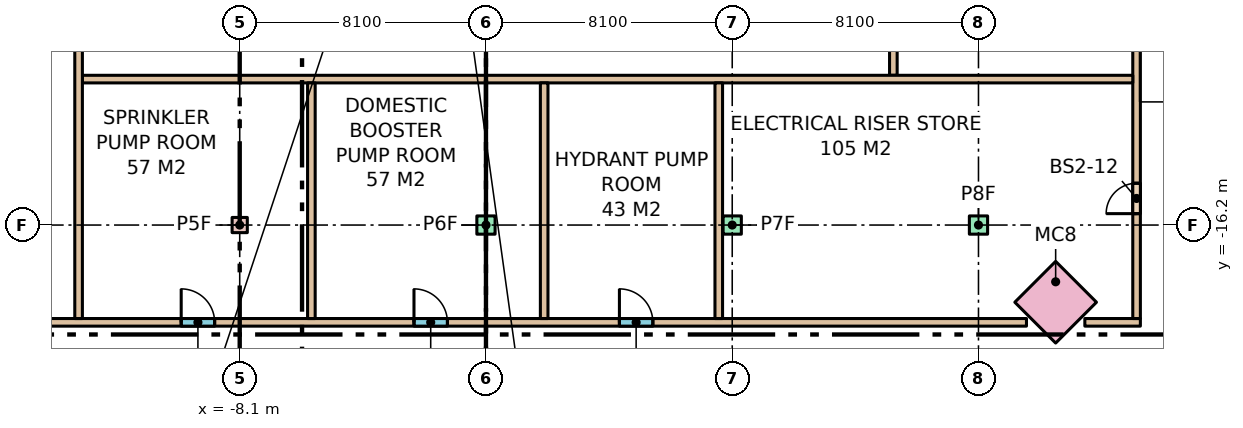
"""IFC4 building model, lengths in metres.
Left out: names, types, materials, properties, quantities, classifications, styles, units other than length and angle.
Written with IfcOpenShell. Run it as: python <this file> out.ifc"""

import sys

from ifc_helpers import new_model, si_unit, direction, frame, frame_2d, origin, origin_2d, place, context, subcontext, project, spatial, rectangle, extrude, element, fill, save


model = new_model("IFC4")
c1 = context("Model", 3, precision=1e-05, world=origin(), true_north=direction((0.0, 1.0)))
c2 = subcontext(c1, "Body", "Model", "MODEL_VIEW")
j1 = project(units=[si_unit("LENGTHUNIT", "METRE"), si_unit("PLANEANGLEUNIT", "RADIAN")], contexts=[c1])
p1 = place(None, origin())
s1 = spatial("IfcSite", under=j1, at=p1, CompositionType="ELEMENT")
p2 = place(p1, origin())
s2 = spatial("IfcBuilding", under=s1, at=p2, CompositionType="ELEMENT")
p3 = place(p2, frame((0.0, 0.0, -7.2)))
s3 = spatial("IfcBuildingStorey", under=s2, at=p3, CompositionType="ELEMENT", Elevation=-7.2)
p4 = place(p3, frame((-8.1, -16.2, 0.0), z_axis=(0.0, 0.0, 1.0), x_axis=(1.0, 0.0, 0.0)))
e1 = element("IfcColumn", 1, at=p4, inside=s3, PredefinedType="COLUMN", context=c2, shape_type="SweptSolid", body=[
    extrude(rectangle(XDim=0.5, YDim=0.5, at=origin_2d()), origin(), (0.0, 0.0, 1.0), 3.6),
])
for number, where, z_axis, x_axis in (
    (2, (0.0, -16.2, 0.0), (0.0, 0.0, 1.0), (1.0, 0.0, 0.0)),
    (3, (8.1, -16.2, 0.0), (0.0, 0.0, 1.0), (1.0, 0.0, 0.0)),
    (4, (16.2, -16.2, 0.0), (0.0, 0.0, 1.0), (1.0, 0.0, 0.0)),
):
    element("IfcColumn", number, at=place(p3, frame(where, z_axis=z_axis, x_axis=x_axis)), inside=s3, PredefinedType="COLUMN", context=c2, shape_type="SweptSolid", body=[
        extrude(rectangle(XDim=0.6, YDim=0.6, at=origin_2d()), origin(), (0.0, 0.0, 1.0), 3.6),
    ])
p5 = place(p3, frame((18.738, -18.738, 0.0), z_axis=(0.0, 0.0, 1.0), x_axis=(0.707106781187, 0.707106781187, 0.0)))
e5 = element("IfcColumn", 5, at=p5, inside=s3, PredefinedType="COLUMN", context=c2, shape_type="SweptSolid", body=[
    extrude(rectangle(XDim=1.9, YDim=1.9, at=origin_2d()), origin(), (0.0, 0.0, 1.0), 3.6),
])
p6 = place(p3, frame((13.4, -11.275, 0.0), z_axis=(0.0, 0.0, 1.0), x_axis=(0.0, 1.0, 0.0)))
e6 = element("IfcWall", 6, at=p6, inside=s3, PredefinedType="PARTITIONING", context=c2, shape_type="SweptSolid", body=[
    extrude(rectangle(XDim=22.55, YDim=0.25, at=frame_2d((11.275, 0.0))), origin(), (0.0, 0.0, 1.0), 3.28),
])
p7 = place(p3, frame((19.698, -19.4, 0.0), z_axis=(0.0, 0.0, 1.0), x_axis=(1.0, 0.0, 0.0)))
e7 = element("IfcWall", 7, at=p7, inside=s3, PredefinedType="PARTITIONING", context=c2, shape_type="SweptSolid", body=[
    extrude(rectangle(XDim=1.827, YDim=0.25, at=frame_2d((0.913, 0.0))), origin(), (0.0, 0.0, 1.0), 3.28),
])
p8 = place(p3, frame((21.4, -19.275, 0.0), z_axis=(0.0, 0.0, 1.0), x_axis=(0.0, 1.0, 0.0)))
e8 = element("IfcWall", 8, at=p8, inside=s3, PredefinedType="PARTITIONING", context=c2, shape_type="SweptSolid", body=[
    extrude(rectangle(XDim=38.55, YDim=0.25, at=frame_2d((19.275, 0.0))), origin(), (0.0, 0.0, 1.0), 3.28),
])
p9 = place(p8, frame((3.45, 0.0, 0.0)))
e9 = element("IfcOpeningElement", 9, at=p9, cuts=e8, PredefinedType="OPENING", context=c2, shape_type="SweptSolid", body=[
    extrude(rectangle(XDim=1.0, YDim=2.1, at=frame_2d((0.5, 1.05))), frame((0.0, 0.135, 0.0), z_axis=(0.0, -1.0, 0.0), x_axis=(1.0, 0.0, 0.0)), (0.0, 0.0, 1.0), 0.27),
])
p10 = place(p8, frame((13.025, 0.0, 0.0)))
e10 = element("IfcOpeningElement", 10, at=p10, cuts=e8, PredefinedType="OPENING", context=c2, shape_type="SweptSolid", body=[
    extrude(rectangle(XDim=1.1, YDim=2.1, at=frame_2d((0.55, 1.05))), frame((0.0, 0.135, 0.0), z_axis=(0.0, -1.0, 0.0), x_axis=(1.0, 0.0, 0.0)), (0.0, 0.0, 1.0), 0.27),
])
p11 = place(p8, frame((24.425, 0.0, 0.0)))
e11 = element("IfcOpeningElement", 11, at=p11, cuts=e8, PredefinedType="OPENING", context=c2, shape_type="SweptSolid", body=[
    extrude(rectangle(XDim=1.1, YDim=2.1, at=frame_2d((0.55, 1.05))), frame((0.0, 0.135, 0.0), z_axis=(0.0, -1.0, 0.0), x_axis=(1.0, 0.0, 0.0)), (0.0, 0.0, 1.0), 0.27),
])
p12 = place(p3, frame((-17.778, -19.4, 0.0), z_axis=(0.0, 0.0, 1.0), x_axis=(1.0, 0.0, 0.0)))
e12 = element("IfcWall", 12, at=p12, inside=s3, PredefinedType="PARTITIONING", context=c2, shape_type="SweptSolid", body=[
    extrude(rectangle(XDim=35.557, YDim=0.25, at=frame_2d((17.778, 0.0))), origin(), (0.0, 0.0, 1.0), 3.28),
])
p13 = place(p12, frame((7.753, 0.0, 0.0)))
e13 = element("IfcOpeningElement", 13, at=p13, cuts=e12, PredefinedType="OPENING", context=c2, shape_type="SweptSolid", body=[
    extrude(rectangle(XDim=1.1, YDim=2.1, at=frame_2d((0.55, 1.05))), frame((0.0, 0.135, 0.0), z_axis=(0.0, -1.0, 0.0), x_axis=(1.0, 0.0, 0.0)), (0.0, 0.0, 1.0), 0.27),
])
p14 = place(p12, frame((15.41, 0.0, 0.0)))
e14 = element("IfcOpeningElement", 14, at=p14, cuts=e12, PredefinedType="OPENING", context=c2, shape_type="SweptSolid", body=[
    extrude(rectangle(XDim=1.1, YDim=2.1, at=frame_2d((0.55, 1.05))), frame((0.0, 0.135, 0.0), z_axis=(0.0, -1.0, 0.0), x_axis=(1.0, 0.0, 0.0)), (0.0, 0.0, 1.0), 0.27),
])
p15 = place(p12, frame((22.167, 0.0, 0.0)))
e15 = element("IfcOpeningElement", 15, at=p15, cuts=e12, PredefinedType="OPENING", context=c2, shape_type="SweptSolid", body=[
    extrude(rectangle(XDim=1.1, YDim=2.1, at=frame_2d((0.55, 1.05))), frame((0.0, 0.135, 0.0), z_axis=(0.0, -1.0, 0.0), x_axis=(1.0, 0.0, 0.0)), (0.0, 0.0, 1.0), 0.27),
])
p16 = place(p3, frame((-13.275, -11.4, 0.0), z_axis=(0.0, 0.0, 1.0), x_axis=(1.0, 0.0, 0.0)))
e16 = element("IfcWall", 16, at=p16, inside=s3, PredefinedType="PARTITIONING", context=c2, shape_type="SweptSolid", body=[
    extrude(rectangle(XDim=34.55, YDim=0.25, at=frame_2d((17.275, 0.0))), origin(), (0.0, 0.0, 1.0), 3.28),
])
p17 = place(p3, frame((-5.743, -19.275, 0.0), z_axis=(0.0, 0.0, 1.0), x_axis=(0.0, 1.0, 0.0)))
e17 = element("IfcWall", 17, at=p17, inside=s3, PredefinedType="PARTITIONING", context=c2, shape_type="SweptSolid", body=[
    extrude(rectangle(XDim=7.75, YDim=0.25, at=frame_2d((3.875, 0.0))), origin(), (0.0, 0.0, 1.0), 3.28),
])
p18 = place(p3, frame((-13.4, -19.275, 0.0), z_axis=(0.0, 0.0, 1.0), x_axis=(0.0, 1.0, 0.0)))
e18 = element("IfcWall", 18, at=p18, inside=s3, PredefinedType="PARTITIONING", context=c2, shape_type="SweptSolid", body=[
    extrude(rectangle(XDim=17.55, YDim=0.25, at=frame_2d((8.775, 0.0))), origin(), (0.0, 0.0, 1.0), 3.28),
])
for number, where, z_axis, x_axis in (
    (19, (1.914, -19.275, 0.0), (0.0, 0.0, 1.0), (0.0, 1.0, 0.0)),
    (20, (7.657, -19.275, 0.0), (0.0, 0.0, 1.0), (0.0, 1.0, 0.0)),
):
    element("IfcWall", number, at=place(p3, frame(where, z_axis=z_axis, x_axis=x_axis)), inside=s3, PredefinedType="PARTITIONING", context=c2, shape_type="SweptSolid", body=[
        extrude(rectangle(XDim=7.75, YDim=0.25, at=frame_2d((3.875, 0.0))), origin(), (0.0, 0.0, 1.0), 3.28),
    ])
p19 = place(p13, origin())
e21 = element("IfcDoor", 21, at=p19, inside=s3, OperationType="SINGLE_SWING_LEFT", PredefinedType="DOOR", context=c2, shape_type="SweptSolid", body=[
    extrude(rectangle(XDim=1.1, YDim=2.1, at=frame_2d((0.55, 1.05))), frame((0.0, 0.025, 0.0), z_axis=(0.0, -1.0, 0.0), x_axis=(1.0, 0.0, 0.0)), (0.0, 0.0, 1.0), 0.05),
])
fill(e13, e21)
p20 = place(p14, origin())
e22 = element("IfcDoor", 22, at=p20, inside=s3, OperationType="SINGLE_SWING_LEFT", PredefinedType="DOOR", context=c2, shape_type="SweptSolid", body=[
    extrude(rectangle(XDim=1.1, YDim=2.1, at=frame_2d((0.55, 1.05))), frame((0.0, 0.025, 0.0), z_axis=(0.0, -1.0, 0.0), x_axis=(1.0, 0.0, 0.0)), (0.0, 0.0, 1.0), 0.05),
])
fill(e14, e22)
p21 = place(p15, origin())
e23 = element("IfcDoor", 23, at=p21, inside=s3, OperationType="SINGLE_SWING_LEFT", PredefinedType="DOOR", context=c2, shape_type="SweptSolid", body=[
    extrude(rectangle(XDim=1.1, YDim=2.1, at=frame_2d((0.55, 1.05))), frame((0.0, 0.025, 0.0), z_axis=(0.0, -1.0, 0.0), x_axis=(1.0, 0.0, 0.0)), (0.0, 0.0, 1.0), 0.05),
])
fill(e15, e23)
p22 = place(p9, origin())
e24 = element("IfcDoor", 24, at=p22, inside=s3, OperationType="SINGLE_SWING_LEFT", PredefinedType="DOOR", context=c2, shape_type="SweptSolid", body=[
    extrude(rectangle(XDim=1.0, YDim=2.1, at=frame_2d((0.5, 1.05))), frame((0.0, 0.025, 0.0), z_axis=(0.0, -1.0, 0.0), x_axis=(1.0, 0.0, 0.0)), (0.0, 0.0, 1.0), 0.05),
])
fill(e9, e24)
save(model, sys.argv[1])
